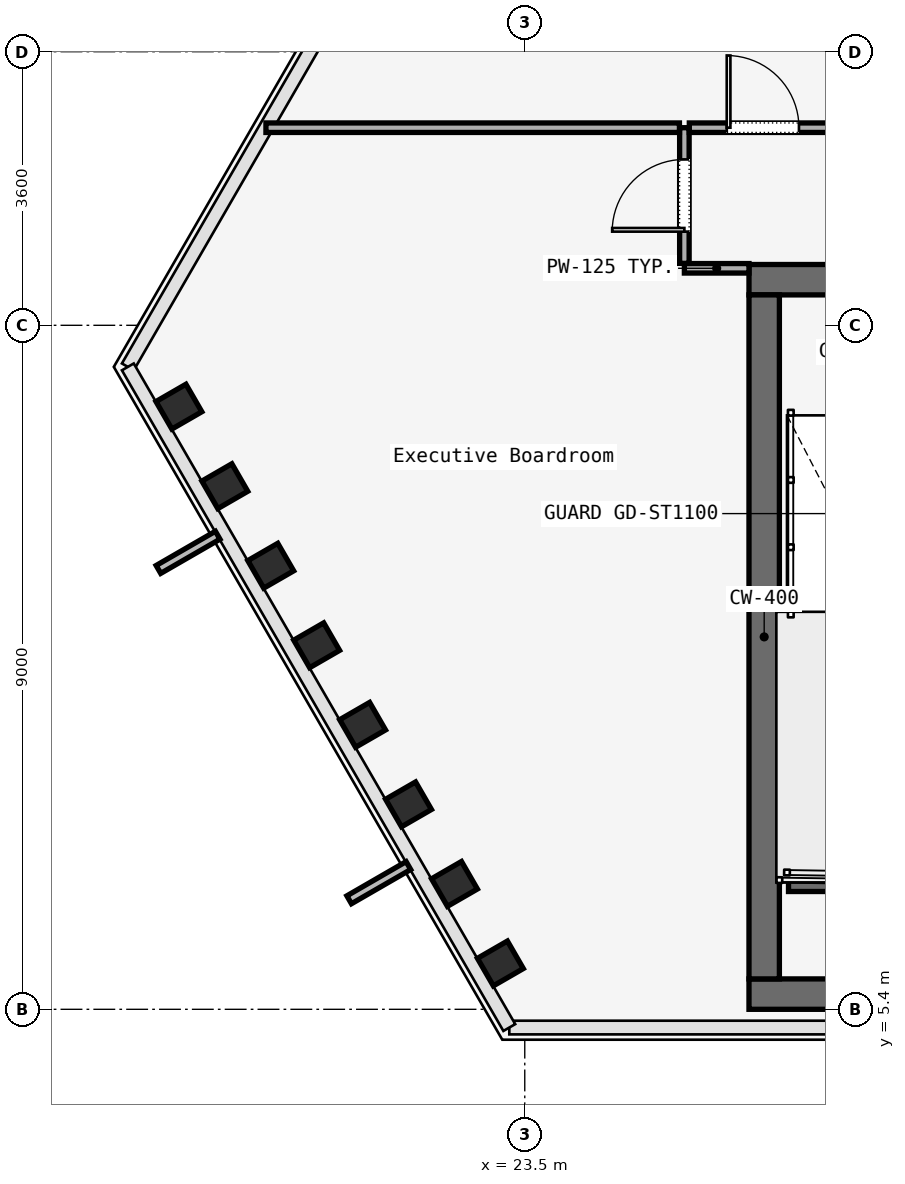
"""IFC4 building model, lengths in metres.
Left out: names, types, materials, properties, quantities, classifications, styles, units other than length and angle.
Written with IfcOpenShell. Run it as: python <this file> out.ifc"""

import sys

from ifc_helpers import new_model, si_unit, direction, frame, frame_2d, origin, origin_2d, place, context, subcontext, project, spatial, rectangle, i_section, extrude, element, fill, save


model = new_model("IFC4")
c1 = context("Model", 3, precision=1e-05, world=origin(), true_north=direction((0.0, 1.0)))
c2 = subcontext(c1, "Body", "Model", "MODEL_VIEW")
j1 = project(units=[si_unit("LENGTHUNIT", "METRE"), si_unit("PLANEANGLEUNIT", "RADIAN")], contexts=[c1])
p1 = place(None, origin())
s1 = spatial("IfcSite", under=j1, at=p1, CompositionType="ELEMENT")
p2 = place(p1, origin())
s2 = spatial("IfcBuilding", under=s1, at=p2, CompositionType="ELEMENT")
p3 = place(p2, frame((0.0, 0.0, 172.6)))
s3 = spatial("IfcBuildingStorey", under=s2, at=p3, CompositionType="ELEMENT", Elevation=172.6)
p4 = place(p3, frame((26.45, 15.0, 0.0), z_axis=(0.0, 0.0, 1.0), x_axis=(1.0, 0.0, 0.0)))
e1 = element("IfcWall", 1, at=p4, inside=s3, PredefinedType="SOLIDWALL", context=c2, shape_type="SweptSolid", body=[
    extrude(rectangle(XDim=31.1, YDim=0.4, at=frame_2d((15.55, 0.0))), origin(), (0.0, 0.0, 1.0), 3.58),
])
p5 = place(p4, frame((1.65, 0.0, 0.0)))
e2 = element("IfcOpeningElement", 2, at=p5, cuts=e1, PredefinedType="OPENING", context=c2, shape_type="SweptSolid", body=[
    extrude(rectangle(XDim=1.1, YDim=2.2, at=frame_2d((0.55, 1.1))), frame((0.0, 0.2, 0.0), z_axis=(0.0, -1.0, 0.0), x_axis=(1.0, 0.0, 0.0)), (0.0, 0.0, 1.0), 0.4),
])
p6 = place(p4, frame((13.65, 0.0, 0.0)))
e3 = element("IfcOpeningElement", 3, at=p6, cuts=e1, PredefinedType="OPENING", context=c2, shape_type="SweptSolid", body=[
    extrude(rectangle(XDim=1.1, YDim=2.2, at=frame_2d((0.55, 1.1))), frame((0.0, 0.2, 0.0), z_axis=(0.0, -1.0, 0.0), x_axis=(1.0, 0.0, 0.0)), (0.0, 0.0, 1.0), 0.4),
])
p7 = place(p4, frame((25.55, 0.0, 0.0)))
e4 = element("IfcOpeningElement", 4, at=p7, cuts=e1, PredefinedType="OPENING", context=c2, shape_type="SweptSolid", body=[
    extrude(rectangle(XDim=1.1, YDim=2.2, at=frame_2d((0.55, 1.1))), frame((0.0, 0.2, 0.0), z_axis=(0.0, -1.0, 0.0), x_axis=(1.0, 0.0, 0.0)), (0.0, 0.0, 1.0), 0.4),
])
p8 = place(p4, frame((10.7, 0.0, 0.0)))
e5 = element("IfcOpeningElement", 5, at=p8, cuts=e1, PredefinedType="OPENING", context=c2, shape_type="SweptSolid", body=[
    extrude(rectangle(XDim=1.4, YDim=2.2, at=frame_2d((0.7, 1.1))), frame((0.0, 0.2, 0.0), z_axis=(0.0, -1.0, 0.0), x_axis=(1.0, 0.0, 0.0)), (0.0, 0.0, 1.0), 0.4),
])
p9 = place(p4, frame((19.35, 0.0, 0.0)))
e6 = element("IfcOpeningElement", 6, at=p9, cuts=e1, PredefinedType="OPENING", context=c2, shape_type="SweptSolid", body=[
    extrude(rectangle(XDim=1.1, YDim=2.2, at=frame_2d((0.55, 1.1))), frame((0.0, 0.2, 0.0), z_axis=(0.0, -1.0, 0.0), x_axis=(1.0, 0.0, 0.0)), (0.0, 0.0, 1.0), 0.4),
])
p10 = place(p4, frame((21.4, 0.0, 0.0)))
e7 = element("IfcOpeningElement", 7, at=p10, cuts=e1, PredefinedType="OPENING", context=c2, shape_type="SweptSolid", body=[
    extrude(rectangle(XDim=0.9, YDim=2.1, at=frame_2d((0.45, 1.05))), frame((0.0, 0.2, 0.0), z_axis=(0.0, -1.0, 0.0), x_axis=(1.0, 0.0, 0.0)), (0.0, 0.0, 1.0), 0.4),
])
p11 = place(p4, frame((23.35, 0.0, 0.0)))
e8 = element("IfcOpeningElement", 8, at=p11, cuts=e1, PredefinedType="OPENING", context=c2, shape_type="SweptSolid", body=[
    extrude(rectangle(XDim=1.3, YDim=2.3, at=frame_2d((0.65, 1.15))), frame((0.0, 0.2, 0.0), z_axis=(0.0, -1.0, 0.0), x_axis=(1.0, 0.0, 0.0)), (0.0, 0.0, 1.0), 0.4),
])
p12 = place(p3, frame((26.45, 5.6, 0.0), z_axis=(0.0, 0.0, 1.0), x_axis=(1.0, 0.0, 0.0)))
e9 = element("IfcWall", 9, at=p12, inside=s3, PredefinedType="SOLIDWALL", context=c2, shape_type="SweptSolid", body=[
    extrude(rectangle(XDim=31.1, YDim=0.4, at=frame_2d((15.55, 0.0))), origin(), (0.0, 0.0, 1.0), 3.58),
])
p13 = place(p3, frame((26.65, 5.8, 0.0), z_axis=(0.0, 0.0, 1.0), x_axis=(0.0, 1.0, 0.0)))
e10 = element("IfcWall", 10, at=p13, inside=s3, PredefinedType="SOLIDWALL", context=c2, shape_type="SweptSolid", body=[
    extrude(rectangle(XDim=9.0, YDim=0.4, at=frame_2d((4.5, 0.0))), origin(), (0.0, 0.0, 1.0), 3.58),
])
for number, where, z_axis, x_axis in (
    (11, (18.949, 13.33, 0.0), (0.0, 0.0, 1.0), (-0.5, 0.866, 0.0)),
    (12, (19.554, 12.283, 0.0), (0.0, 0.0, 1.0), (-0.5, 0.866, 0.0)),
    (13, (20.158, 11.236, 0.0), (0.0, 0.0, 1.0), (-0.5, 0.866, 0.0)),
    (14, (20.762, 10.19, 0.0), (0.0, 0.0, 1.0), (-0.5, 0.866, 0.0)),
    (15, (21.366, 9.143, 0.0), (0.0, 0.0, 1.0), (-0.5, 0.866, 0.0)),
    (16, (21.971, 8.096, 0.0), (0.0, 0.0, 1.0), (-0.5, 0.866, 0.0)),
    (17, (22.575, 7.05, 0.0), (0.0, 0.0, 1.0), (-0.5, 0.866, 0.0)),
    (18, (23.179, 6.003, 0.0), (0.0, 0.0, 1.0), (-0.5, 0.866, 0.0)),
):
    element("IfcColumn", number, at=place(p3, frame(where, z_axis=z_axis, x_axis=x_axis)), inside=s3, PredefinedType="COLUMN", context=c2, shape_type="SweptSolid", body=[
        extrude(i_section(OverallWidth=0.418, OverallDepth=0.455, WebThickness=0.042, FlangeThickness=0.052, FilletRadius=0.015, at=origin_2d()), origin(), (0.0, 0.0, 1.0), 3.58),
    ])
p14 = place(p3, frame((26.97, 7.05, 0.0), z_axis=(0.0, 0.0, 1.0), x_axis=(1.0, 0.0, 0.0)))
e19 = element("IfcWall", 19, at=p14, inside=s3, PredefinedType="SOLIDWALL", context=c2, shape_type="SweptSolid", body=[
    extrude(rectangle(XDim=3.115, YDim=0.2, at=frame_2d((1.558, 0.0))), origin(), (0.0, 0.0, 1.0), 3.8),
])
p15 = place(p3, frame((26.45, 15.15, 0.0), z_axis=(0.0, 0.0, 1.0), x_axis=(-1.0, 0.0, 0.0)))
e20 = element("IfcWall", 20, at=p15, inside=s3, PredefinedType="PARTITIONING", context=c2, shape_type="SweptSolid", body=[
    extrude(rectangle(XDim=0.85, YDim=0.125, at=frame_2d((0.425, 0.0))), origin(), (0.0, 0.0, 1.0), 3.01),
])
p16 = place(p3, frame((25.6, 15.215, 0.0), z_axis=(0.0, 0.0, 1.0), x_axis=(0.0, 1.0, 0.0)))
e21 = element("IfcWall", 21, at=p16, inside=s3, PredefinedType="PARTITIONING", context=c2, shape_type="SweptSolid", body=[
    extrude(rectangle(XDim=1.785, YDim=0.125, at=frame_2d((0.893, 0.0))), origin(), (0.0, 0.0, 1.0), 3.01),
])
p17 = place(p16, frame((0.417, 0.0, 0.0)))
e22 = element("IfcOpeningElement", 22, at=p17, cuts=e21, PredefinedType="OPENING", context=c2, shape_type="SweptSolid", body=[
    extrude(rectangle(XDim=0.95, YDim=2.2, at=frame_2d((0.475, 1.1))), frame((0.0, 0.062, 0.0), z_axis=(0.0, -1.0, 0.0), x_axis=(1.0, 0.0, 0.0)), (0.0, 0.0, 1.0), 0.125),
])
p18 = place(p3, frame((25.665, 17.0, 0.0), z_axis=(0.0, 0.0, 1.0), x_axis=(1.0, 0.0, 0.0)))
e23 = element("IfcWall", 23, at=p18, inside=s3, PredefinedType="PARTITIONING", context=c2, shape_type="SweptSolid", body=[
    extrude(rectangle(XDim=1.935, YDim=0.125, at=frame_2d((0.968, 0.0))), origin(), (0.0, 0.0, 1.0), 3.01),
])
p19 = place(p18, frame((0.492, 0.0, 0.0)))
e24 = element("IfcOpeningElement", 24, at=p19, cuts=e23, PredefinedType="OPENING", context=c2, shape_type="SweptSolid", body=[
    extrude(rectangle(XDim=0.95, YDim=2.2, at=frame_2d((0.475, 1.1))), frame((0.0, 0.062, 0.0), z_axis=(0.0, -1.0, 0.0), x_axis=(1.0, 0.0, 0.0)), (0.0, 0.0, 1.0), 0.125),
])
p20 = place(p3, frame((20.095, 17.0, 0.0), z_axis=(0.0, 0.0, 1.0), x_axis=(1.0, 0.0, 0.0)))
e25 = element("IfcWall", 25, at=p20, inside=s3, PredefinedType="PARTITIONING", context=c2, shape_type="SweptSolid", body=[
    extrude(rectangle(XDim=5.44, YDim=0.125, at=frame_2d((2.72, 0.0))), origin(), (0.0, 0.0, 1.0), 3.01),
])
p21 = place(p17, origin())
e26 = element("IfcDoor", 26, at=p21, inside=s3, OperationType="SINGLE_SWING_RIGHT", PredefinedType="DOOR", context=c2, shape_type="SweptSolid", body=[
    extrude(rectangle(XDim=0.95, YDim=2.2, at=frame_2d((0.475, 1.1))), frame((0.0, 0.025, 0.0), z_axis=(0.0, -1.0, 0.0), x_axis=(1.0, 0.0, 0.0)), (0.0, 0.0, 1.0), 0.05),
])
fill(e22, e26)
p22 = place(p19, origin())
e27 = element("IfcDoor", 27, at=p22, inside=s3, OperationType="SINGLE_SWING_LEFT", PredefinedType="DOOR", context=c2, shape_type="SweptSolid", body=[
    extrude(rectangle(XDim=0.95, YDim=2.2, at=frame_2d((0.475, 1.1))), frame((0.0, 0.025, 0.0), z_axis=(0.0, -1.0, 0.0), x_axis=(1.0, 0.0, 0.0)), (0.0, 0.0, 1.0), 0.05),
])
fill(e24, e27)
save(model, sys.argv[1])
